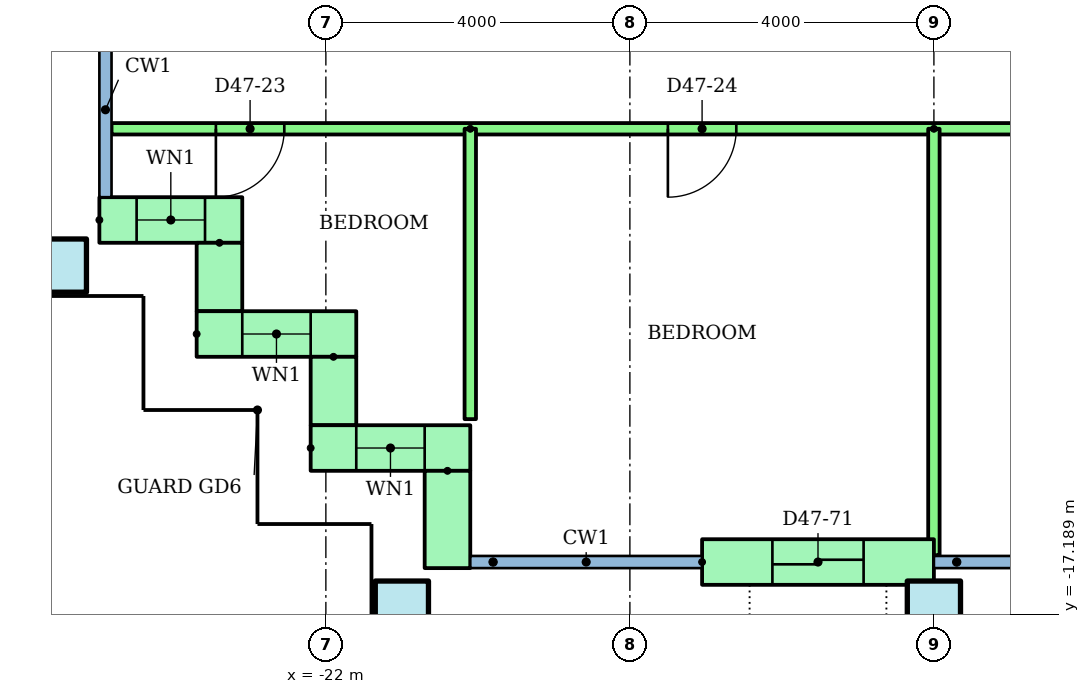
"""IFC4 building model, lengths in metres.
Left out: names, types, materials, properties, quantities, classifications, styles, units other than length and angle.
Written with IfcOpenShell. Run it as: python <this file> out.ifc"""

import sys

from ifc_helpers import new_model, si_unit, direction, frame, frame_2d, origin, origin_2d, place, context, subcontext, project, spatial, rectangle, hollow_rectangle, extrude, element, fill, save


model = new_model("IFC4")
c1 = context("Model", 3, precision=1e-05, world=origin(), true_north=direction((0.0, 1.0)))
c2 = subcontext(c1, "Body", "Model", "MODEL_VIEW")
j1 = project(units=[si_unit("LENGTHUNIT", "METRE"), si_unit("PLANEANGLEUNIT", "RADIAN")], contexts=[c1])
p1 = place(None, origin())
s1 = spatial("IfcSite", under=j1, at=p1, CompositionType="ELEMENT")
p2 = place(p1, origin())
s2 = spatial("IfcBuilding", under=s1, at=p2, CompositionType="ELEMENT")
p3 = place(p2, frame((0.0, 0.0, 181.3)))
s3 = spatial("IfcBuildingStorey", under=s2, at=p3, CompositionType="ELEMENT", Elevation=181.3)
for number, where in (
    (1, (-21.0, -17.1, 0.0)),
    (2, (-14.0, -17.1, 0.0)),
    (3, (-25.5, -12.6, 0.0)),
):
    element("IfcColumn", number, at=place(p3, frame(where)), inside=s3, PredefinedType="COLUMN", context=c2, shape_type="SweptSolid", body=[
        extrude(hollow_rectangle(XDim=0.7, YDim=0.7, WallThickness=0.036, at=origin_2d()), origin(), (0.0, 0.0, 1.0), 3.2),
    ])
p4 = place(p3, frame((-24.98, -12.0, 0.0)))
e4 = element("IfcWall", 4, at=p4, inside=s3, PredefinedType="STANDARD", context=c2, shape_type="SweptSolid", body=[
    extrude(rectangle(XDim=1.88, YDim=0.6, at=frame_2d((0.94, 0.0))), origin(), (0.0, 0.0, 1.0), 2.92),
])
p5 = place(p4, frame((0.49, 0.0, 0.9)))
e5 = element("IfcOpeningElement", 5, at=p5, cuts=e4, PredefinedType="OPENING", context=c2, shape_type="SweptSolid", body=[
    extrude(rectangle(XDim=0.9, YDim=1.5, at=frame_2d((0.45, 0.75))), frame((0.0, 0.31, 0.0), z_axis=(0.0, -1.0, 0.0), x_axis=(1.0, 0.0, 0.0)), (0.0, 0.0, 1.0), 0.62),
])
p6 = place(p3, frame((-23.4, -12.3, 0.0), z_axis=(0.0, 0.0, 1.0), x_axis=(0.0, -1.0, 0.0)))
e6 = element("IfcWall", 6, at=p6, inside=s3, PredefinedType="STANDARD", context=c2, shape_type="SweptSolid", body=[
    extrude(rectangle(XDim=0.9, YDim=0.6, at=frame_2d((0.45, 0.0))), origin(), (0.0, 0.0, 1.0), 2.92),
])
p7 = place(p3, frame((-23.7, -13.5, 0.0)))
e7 = element("IfcWall", 7, at=p7, inside=s3, PredefinedType="STANDARD", context=c2, shape_type="SweptSolid", body=[
    extrude(rectangle(XDim=2.1, YDim=0.6, at=frame_2d((1.05, 0.0))), origin(), (0.0, 0.0, 1.0), 2.92),
])
p8 = place(p7, frame((0.6, 0.0, 0.9)))
e8 = element("IfcOpeningElement", 8, at=p8, cuts=e7, PredefinedType="OPENING", context=c2, shape_type="SweptSolid", body=[
    extrude(rectangle(XDim=0.9, YDim=1.5, at=frame_2d((0.45, 0.75))), frame((0.0, 0.31, 0.0), z_axis=(0.0, -1.0, 0.0), x_axis=(1.0, 0.0, 0.0)), (0.0, 0.0, 1.0), 0.62),
])
p9 = place(p3, frame((-21.9, -13.8, 0.0), z_axis=(0.0, 0.0, 1.0), x_axis=(0.0, -1.0, 0.0)))
e9 = element("IfcWall", 9, at=p9, inside=s3, PredefinedType="STANDARD", context=c2, shape_type="SweptSolid", body=[
    extrude(rectangle(XDim=0.9, YDim=0.6, at=frame_2d((0.45, 0.0))), origin(), (0.0, 0.0, 1.0), 2.92),
])
p10 = place(p3, frame((-22.2, -15.0, 0.0)))
e10 = element("IfcWall", 10, at=p10, inside=s3, PredefinedType="STANDARD", context=c2, shape_type="SweptSolid", body=[
    extrude(rectangle(XDim=2.1, YDim=0.6, at=frame_2d((1.05, 0.0))), origin(), (0.0, 0.0, 1.0), 2.92),
])
p11 = place(p10, frame((0.6, 0.0, 0.9)))
e11 = element("IfcOpeningElement", 11, at=p11, cuts=e10, PredefinedType="OPENING", context=c2, shape_type="SweptSolid", body=[
    extrude(rectangle(XDim=0.9, YDim=1.5, at=frame_2d((0.45, 0.75))), frame((0.0, 0.31, 0.0), z_axis=(0.0, -1.0, 0.0), x_axis=(1.0, 0.0, 0.0)), (0.0, 0.0, 1.0), 0.62),
])
p12 = place(p3, frame((-20.4, -15.3, 0.0), z_axis=(0.0, 0.0, 1.0), x_axis=(0.0, -1.0, 0.0)))
e12 = element("IfcWall", 12, at=p12, inside=s3, PredefinedType="STANDARD", context=c2, shape_type="SweptSolid", body=[
    extrude(rectangle(XDim=1.28, YDim=0.6, at=frame_2d((0.64, 0.0))), origin(), (0.0, 0.0, 1.0), 2.92),
])
p13 = place(p3, frame((-17.05, -16.5, 0.0)))
e13 = element("IfcWall", 13, at=p13, inside=s3, PredefinedType="STANDARD", context=c2, shape_type="SweptSolid", body=[
    extrude(rectangle(XDim=3.05, YDim=0.6, at=frame_2d((1.525, 0.0))), origin(), (0.0, 0.0, 1.0), 2.92),
])
p14 = place(p13, frame((0.925, 0.0, 0.0)))
e14 = element("IfcOpeningElement", 14, at=p14, cuts=e13, PredefinedType="OPENING", context=c2, shape_type="SweptSolid", body=[
    extrude(rectangle(XDim=1.2, YDim=2.1, at=frame_2d((0.6, 1.05))), frame((0.0, 0.31, 0.0), z_axis=(0.0, -1.0, 0.0), x_axis=(1.0, 0.0, 0.0)), (0.0, 0.0, 1.0), 0.62),
])
p15 = place(p3, frame((2.0, -10.8, 0.0), z_axis=(0.0, 0.0, 1.0), x_axis=(-1.0, 0.0, 0.0)))
e15 = element("IfcWall", 15, at=p15, inside=s3, PredefinedType="PARTITIONING", context=c2, shape_type="SweptSolid", body=[
    extrude(rectangle(XDim=26.82, YDim=0.15, at=frame_2d((13.41, 0.0))), origin(), (0.0, 0.0, 1.0), 2.4),
])
p16 = place(p15, frame((24.547, 0.0, 0.0)))
e16 = element("IfcOpeningElement", 16, at=p16, cuts=e15, PredefinedType="OPENING", context=c2, shape_type="SweptSolid", body=[
    extrude(rectangle(XDim=0.9, YDim=2.1, at=frame_2d((0.45, 1.05))), frame((0.0, 0.085, 0.0), z_axis=(0.0, -1.0, 0.0), x_axis=(1.0, 0.0, 0.0)), (0.0, 0.0, 1.0), 0.17),
])
p17 = place(p15, frame((18.6, 0.0, 0.0)))
e17 = element("IfcOpeningElement", 17, at=p17, cuts=e15, PredefinedType="OPENING", context=c2, shape_type="SweptSolid", body=[
    extrude(rectangle(XDim=0.9, YDim=2.1, at=frame_2d((0.45, 1.05))), frame((0.0, 0.085, 0.0), z_axis=(0.0, -1.0, 0.0), x_axis=(1.0, 0.0, 0.0)), (0.0, 0.0, 1.0), 0.17),
])
p18 = place(p15, frame((11.5, 0.0, 0.0)))
e18 = element("IfcOpeningElement", 18, at=p18, cuts=e15, PredefinedType="OPENING", context=c2, shape_type="SweptSolid", body=[
    extrude(rectangle(XDim=1.0, YDim=2.1, at=frame_2d((0.5, 1.05))), frame((0.0, 0.085, 0.0), z_axis=(0.0, -1.0, 0.0), x_axis=(1.0, 0.0, 0.0)), (0.0, 0.0, 1.0), 0.17),
])
p19 = place(p15, frame((5.55, 0.0, 0.0)))
e19 = element("IfcOpeningElement", 19, at=p19, cuts=e15, PredefinedType="OPENING", context=c2, shape_type="SweptSolid", body=[
    extrude(rectangle(XDim=0.9, YDim=2.1, at=frame_2d((0.45, 1.05))), frame((0.0, 0.085, 0.0), z_axis=(0.0, -1.0, 0.0), x_axis=(1.0, 0.0, 0.0)), (0.0, 0.0, 1.0), 0.17),
])
p20 = place(p15, frame((1.55, 0.0, 0.0)))
e20 = element("IfcOpeningElement", 20, at=p20, cuts=e15, PredefinedType="OPENING", context=c2, shape_type="SweptSolid", body=[
    extrude(rectangle(XDim=0.9, YDim=2.1, at=frame_2d((0.45, 1.05))), frame((0.0, 0.085, 0.0), z_axis=(0.0, -1.0, 0.0), x_axis=(1.0, 0.0, 0.0)), (0.0, 0.0, 1.0), 0.17),
])
p21 = place(p3, frame((-20.1, -10.8, 0.0), z_axis=(0.0, 0.0, 1.0), x_axis=(0.0, -1.0, 0.0)))
e21 = element("IfcWall", 21, at=p21, inside=s3, PredefinedType="PARTITIONING", context=c2, shape_type="SweptSolid", body=[
    extrude(rectangle(XDim=3.82, YDim=0.15, at=frame_2d((1.91, 0.0))), origin(), (0.0, 0.0, 1.0), 2.4),
])
p22 = place(p3, frame((-14.0, -10.8, 0.0), z_axis=(0.0, 0.0, 1.0), x_axis=(0.0, -1.0, 0.0)))
e22 = element("IfcWall", 22, at=p22, inside=s3, PredefinedType="PARTITIONING", context=c2, shape_type="SweptSolid", body=[
    extrude(rectangle(XDim=5.61, YDim=0.15, at=frame_2d((2.805, 0.0))), origin(), (0.0, 0.0, 1.0), 2.4),
])
p23 = place(p5, origin())
e23 = element("IfcWindow", 23, at=p23, inside=s3, PartitioningType="SINGLE_PANEL", PredefinedType="WINDOW", context=c2, shape_type="SweptSolid", body=[
    extrude(rectangle(XDim=0.9, YDim=1.5, at=frame_2d((0.45, 0.75))), frame((0.0, 0.03, 0.0), z_axis=(0.0, -1.0, 0.0), x_axis=(1.0, 0.0, 0.0)), (0.0, 0.0, 1.0), 0.06),
])
fill(e5, e23)
p24 = place(p8, origin())
e24 = element("IfcWindow", 24, at=p24, inside=s3, PartitioningType="SINGLE_PANEL", PredefinedType="WINDOW", context=c2, shape_type="SweptSolid", body=[
    extrude(rectangle(XDim=0.9, YDim=1.5, at=frame_2d((0.45, 0.75))), frame((0.0, 0.03, 0.0), z_axis=(0.0, -1.0, 0.0), x_axis=(1.0, 0.0, 0.0)), (0.0, 0.0, 1.0), 0.06),
])
fill(e8, e24)
p25 = place(p11, origin())
e25 = element("IfcWindow", 25, at=p25, inside=s3, PartitioningType="SINGLE_PANEL", PredefinedType="WINDOW", context=c2, shape_type="SweptSolid", body=[
    extrude(rectangle(XDim=0.9, YDim=1.5, at=frame_2d((0.45, 0.75))), frame((0.0, 0.03, 0.0), z_axis=(0.0, -1.0, 0.0), x_axis=(1.0, 0.0, 0.0)), (0.0, 0.0, 1.0), 0.06),
])
fill(e11, e25)
p26 = place(p16, origin())
e26 = element("IfcDoor", 26, at=p26, inside=s3, OperationType="SINGLE_SWING_RIGHT", PredefinedType="DOOR", context=c2, shape_type="SweptSolid", body=[
    extrude(rectangle(XDim=0.9, YDim=2.1, at=frame_2d((0.45, 1.05))), frame((0.0, 0.025, 0.0), z_axis=(0.0, -1.0, 0.0), x_axis=(1.0, 0.0, 0.0)), (0.0, 0.0, 1.0), 0.05),
])
fill(e16, e26)
p27 = place(p17, origin())
e27 = element("IfcDoor", 27, at=p27, inside=s3, OperationType="SINGLE_SWING_RIGHT", PredefinedType="DOOR", context=c2, shape_type="SweptSolid", body=[
    extrude(rectangle(XDim=0.9, YDim=2.1, at=frame_2d((0.45, 1.05))), frame((0.0, 0.025, 0.0), z_axis=(0.0, -1.0, 0.0), x_axis=(1.0, 0.0, 0.0)), (0.0, 0.0, 1.0), 0.05),
])
fill(e17, e27)
p28 = place(p14, origin())
e28 = element("IfcDoor", 28, at=p28, inside=s3, OperationType="SLIDING_TO_LEFT", PredefinedType="DOOR", context=c2, shape_type="SweptSolid", body=[
    extrude(rectangle(XDim=1.2, YDim=2.1, at=frame_2d((0.6, 1.05))), frame((0.0, 0.025, 0.0), z_axis=(0.0, -1.0, 0.0), x_axis=(1.0, 0.0, 0.0)), (0.0, 0.0, 1.0), 0.05),
])
fill(e14, e28)
save(model, sys.argv[1])
